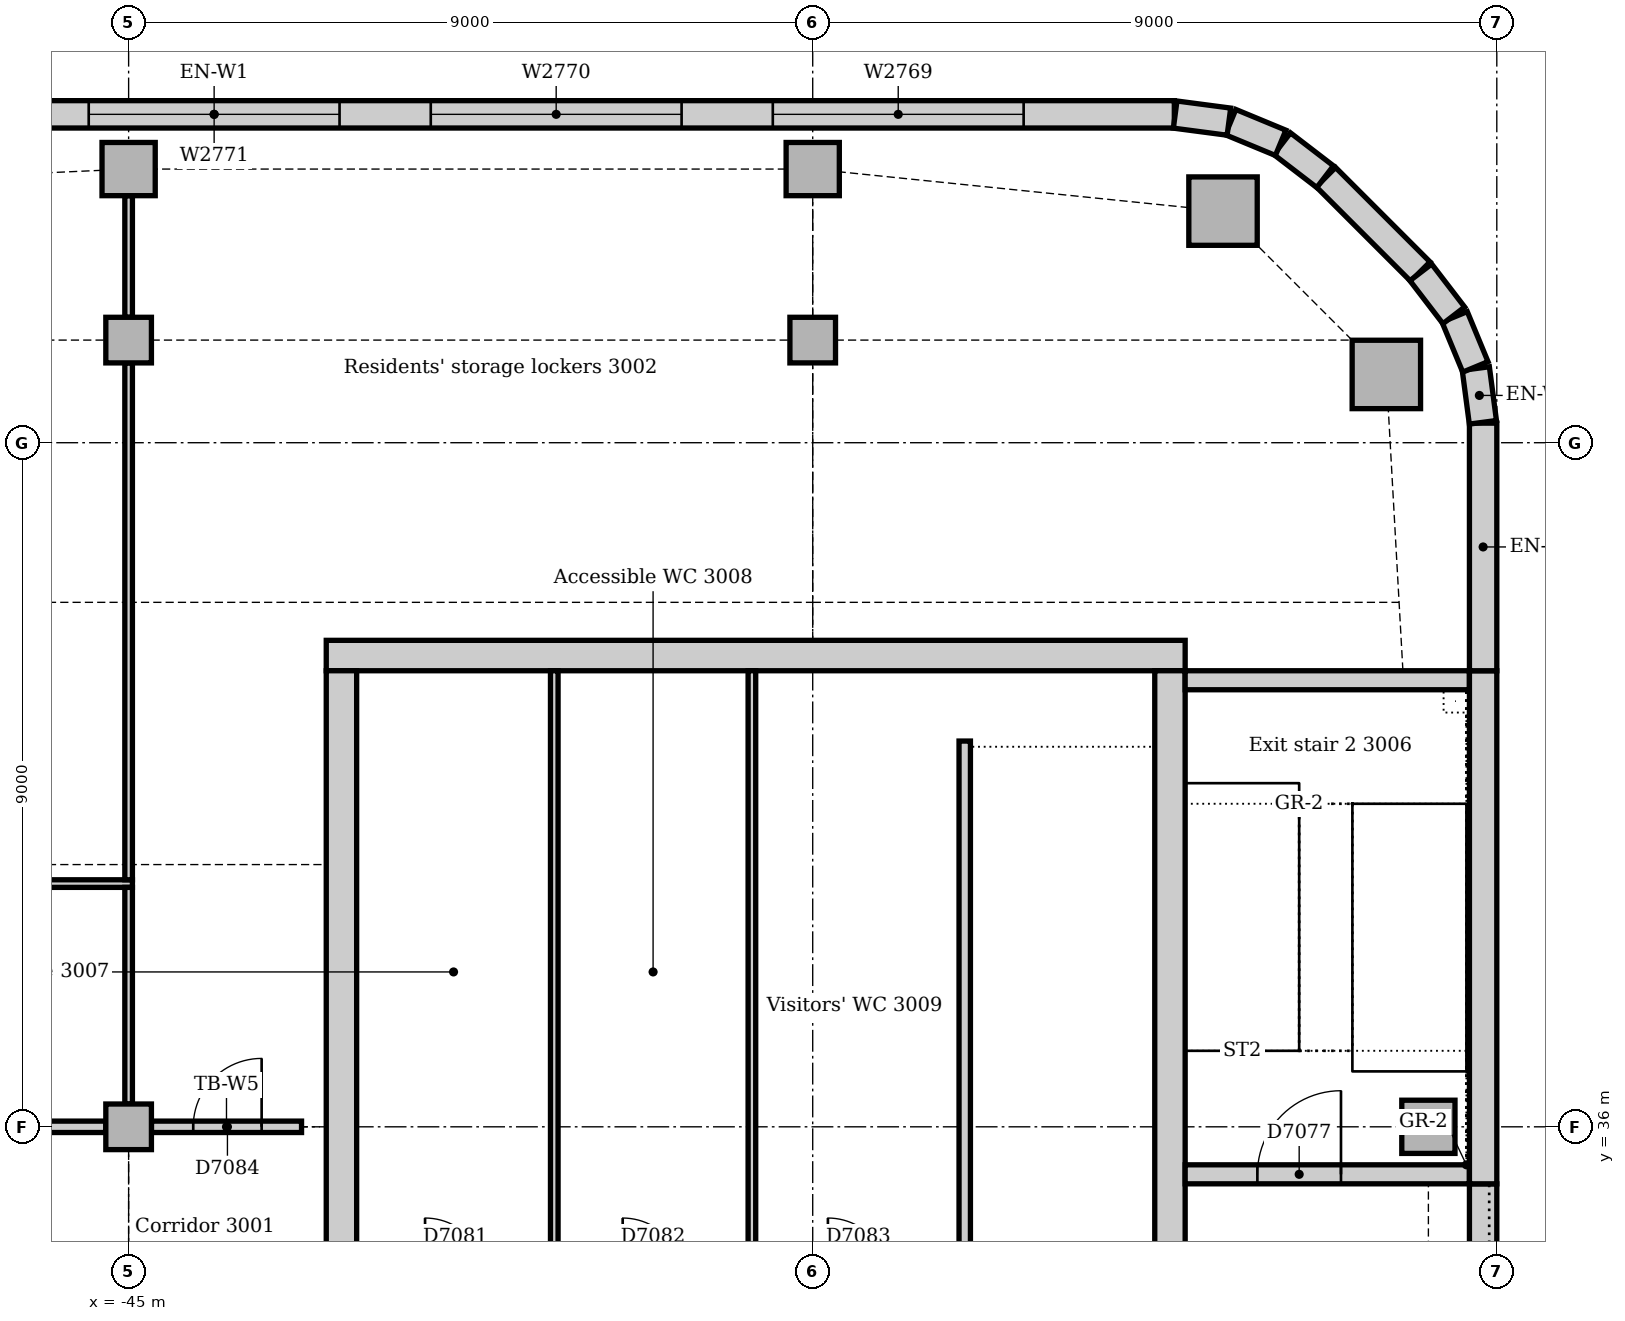
"""IFC4 building model, lengths in metres.
Left out: names, types, materials, properties, quantities, classifications, styles, units other than length and angle.
Written with IfcOpenShell. Run it as: python <this file> out.ifc"""

import sys

from ifc_helpers import new_model, si_unit, direction, frame, frame_2d, origin, origin_2d, place, context, subcontext, project, spatial, rectangle, extrude, element, fill, save


model = new_model("IFC4")
c1 = context("Model", 3, precision=1e-05, world=origin(), true_north=direction((0.0, 1.0)))
c2 = subcontext(c1, "Body", "Model", "MODEL_VIEW")
j1 = project(units=[si_unit("LENGTHUNIT", "METRE"), si_unit("PLANEANGLEUNIT", "RADIAN")], contexts=[c1])
p1 = place(None, origin())
s1 = spatial("IfcSite", under=j1, at=p1, CompositionType="ELEMENT")
p2 = place(p1, origin())
s2 = spatial("IfcBuilding", under=s1, at=p2, CompositionType="ELEMENT")
p3 = place(p2, frame((0.0, 0.0, 128.0)))
s3 = spatial("IfcBuildingStorey", under=s2, at=p3, CompositionType="ELEMENT", Elevation=128.0)
p4 = place(p3, frame((-31.1, 42.2, 0.0), z_axis=(0.0, 0.0, 1.0), x_axis=(-1.0, 0.0, 0.0)))
e1 = element("IfcWall", 1, at=p4, inside=s3, PredefinedType="SOLIDWALL", context=c2, shape_type="SweptSolid", body=[
    extrude(rectangle(XDim=11.3, YDim=0.4, at=frame_2d((5.65, 0.0))), origin(), (0.0, 0.0, 1.0), 4.0),
])
p5 = place(p3, frame((-31.3, 30.5, 0.0), z_axis=(0.0, 0.0, 1.0), x_axis=(0.0, 1.0, 0.0)))
e2 = element("IfcWall", 2, at=p5, inside=s3, PredefinedType="SOLIDWALL", context=c2, shape_type="SweptSolid", body=[
    extrude(rectangle(XDim=11.5, YDim=0.4, at=frame_2d((5.75, 0.0))), origin(), (0.0, 0.0, 1.0), 4.0),
])
p6 = place(p5, frame((0.85, 0.0, 0.0)))
e3 = element("IfcOpeningElement", 3, at=p6, cuts=e2, PredefinedType="OPENING", context=c2, shape_type="SweptSolid", body=[
    extrude(rectangle(XDim=1.8, YDim=2.1, at=frame_2d((0.9, 1.05))), frame((0.0, 0.21, 0.0), z_axis=(0.0, -1.0, 0.0), x_axis=(1.0, 0.0, 0.0)), (0.0, 0.0, 1.0), 0.42),
])
p7 = place(p3, frame((-42.2, 42.0, 0.0), z_axis=(0.0, 0.0, 1.0), x_axis=(0.0, -1.0, 0.0)))
e4 = element("IfcWall", 4, at=p7, inside=s3, PredefinedType="SOLIDWALL", context=c2, shape_type="SweptSolid", body=[
    extrude(rectangle(XDim=11.5, YDim=0.4, at=frame_2d((5.75, 0.0))), origin(), (0.0, 0.0, 1.0), 4.0),
])
p8 = place(p7, frame((8.85, 0.0, 0.0)))
e5 = element("IfcOpeningElement", 5, at=p8, cuts=e4, PredefinedType="OPENING", context=c2, shape_type="SweptSolid", body=[
    extrude(rectangle(XDim=1.8, YDim=2.1, at=frame_2d((0.9, 1.05))), frame((0.0, 0.21, 0.0), z_axis=(0.0, -1.0, 0.0), x_axis=(1.0, 0.0, 0.0)), (0.0, 0.0, 1.0), 0.42),
])
p9 = place(p3, frame((-31.1, 35.375, 0.0), z_axis=(0.0, 0.0, 1.0), x_axis=(1.0, 0.0, 0.0)))
e6 = element("IfcWall", 6, at=p9, inside=s3, PredefinedType="SOLIDWALL", context=c2, shape_type="SweptSolid", body=[
    extrude(rectangle(XDim=3.74, YDim=0.25, at=frame_2d((1.87, 0.0))), origin(), (0.0, 0.0, 1.0), 4.0),
])
p10 = place(p9, frame((0.95, 0.0, 0.0)))
e7 = element("IfcOpeningElement", 7, at=p10, cuts=e6, PredefinedType="OPENING", context=c2, shape_type="SweptSolid", body=[
    extrude(rectangle(XDim=1.1, YDim=2.1, at=frame_2d((0.55, 1.05))), frame((0.0, 0.135, 0.0), z_axis=(0.0, -1.0, 0.0), x_axis=(1.0, 0.0, 0.0)), (0.0, 0.0, 1.0), 0.27),
])
p11 = place(p3, frame((-27.36, 41.875, 0.0), z_axis=(0.0, 0.0, 1.0), x_axis=(-1.0, 0.0, 0.0)))
e8 = element("IfcWall", 8, at=p11, inside=s3, PredefinedType="SOLIDWALL", context=c2, shape_type="SweptSolid", body=[
    extrude(rectangle(XDim=3.74, YDim=0.25, at=frame_2d((1.87, 0.0))), origin(), (0.0, 0.0, 1.0), 4.0),
])
for number, where, z_axis, x_axis in (
    (9, (-28.453, 45.898, 0.0), (0.0, 0.0, 1.0), (1.0, 0.0, 0.0)),
    (10, (-30.602, 48.047, 0.0), (0.0, 0.0, 1.0), (1.0, 0.0, 0.0)),
):
    element("IfcColumn", number, at=place(p3, frame(where, z_axis=z_axis, x_axis=x_axis)), inside=s3, PredefinedType="COLUMN", context=c2, shape_type="SweptSolid", body=[
        extrude(rectangle(XDim=0.9, YDim=0.9, at=origin_2d()), origin(), (0.0, 0.0, 1.0), 3.85),
    ])
p12 = place(p3, frame((-27.9, 36.0, 0.0), z_axis=(0.0, 0.0, 1.0), x_axis=(1.0, 0.0, 0.0)))
e11 = element("IfcColumn", 11, at=p12, inside=s3, PredefinedType="COLUMN", context=c2, shape_type="SweptSolid", body=[
    extrude(rectangle(XDim=0.7, YDim=0.7, at=origin_2d()), origin(), (0.0, 0.0, 1.0), 4.0),
])
for number, where, z_axis, x_axis in (
    (12, (-45.0, 48.6, 0.0), (0.0, 0.0, 1.0), (1.0, 0.0, 0.0)),
    (13, (-36.0, 48.6, 0.0), (0.0, 0.0, 1.0), (1.0, 0.0, 0.0)),
):
    element("IfcColumn", number, at=place(p3, frame(where, z_axis=z_axis, x_axis=x_axis)), inside=s3, PredefinedType="COLUMN", context=c2, shape_type="SweptSolid", body=[
        extrude(rectangle(XDim=0.7, YDim=0.7, at=origin_2d()), origin(), (0.0, 0.0, 1.0), 3.85),
    ])
for number, where, z_axis, x_axis in (
    (14, (-45.0, 36.0, 0.0), (0.0, 0.0, 1.0), (1.0, 0.0, 0.0)),
    (15, (-45.0, 46.35, 0.0), (0.0, 0.0, 1.0), (1.0, 0.0, 0.0)),
    (16, (-36.0, 46.35, 0.0), (0.0, 0.0, 1.0), (1.0, 0.0, 0.0)),
):
    element("IfcColumn", number, at=place(p3, frame(where, z_axis=z_axis, x_axis=x_axis)), inside=s3, PredefinedType="COLUMN", context=c2, shape_type="SweptSolid", body=[
        extrude(rectangle(XDim=0.6, YDim=0.6, at=origin_2d()), origin(), (0.0, 0.0, 1.0), 3.85),
    ])
p13 = place(p3, frame((-27.18, 27.75, 0.0), z_axis=(0.0, 0.0, 1.0), x_axis=(0.0, 1.0, 0.0)))
e17 = element("IfcWall", 17, at=p13, inside=s3, PredefinedType="STANDARD", context=c2, shape_type="SweptSolid", body=[
    extrude(rectangle(XDim=7.5, YDim=0.36, at=frame_2d((3.75, 0.0))), origin(), (0.0, 0.0, 1.0), 3.85),
])
p14 = place(p13, frame((2.85, 0.0, 1.2)))
e18 = element("IfcOpeningElement", 18, at=p14, cuts=e17, PredefinedType="OPENING", context=c2, shape_type="SweptSolid", body=[
    extrude(rectangle(XDim=1.8, YDim=1.2, at=frame_2d((0.9, 0.6))), frame((0.0, 0.19, 0.0), z_axis=(0.0, -1.0, 0.0), x_axis=(1.0, 0.0, 0.0)), (0.0, 0.0, 1.0), 0.38),
])
p15 = place(p3, frame((-27.18, 35.25, 0.0), z_axis=(0.0, 0.0, 1.0), x_axis=(0.0, 1.0, 0.0)))
e19 = element("IfcWall", 19, at=p15, inside=s3, PredefinedType="STANDARD", context=c2, shape_type="SweptSolid", body=[
    extrude(rectangle(XDim=6.75, YDim=0.36, at=frame_2d((3.375, 0.0))), origin(), (0.0, 0.0, 1.0), 3.85),
])
p16 = place(p3, frame((-27.18, 42.0, 0.0), z_axis=(0.0, 0.0, 1.0), x_axis=(0.0, 1.0, 0.0)))
e20 = element("IfcWall", 20, at=p16, inside=s3, PredefinedType="STANDARD", context=c2, shape_type="SweptSolid", body=[
    extrude(rectangle(XDim=3.257, YDim=0.36, at=frame_2d((1.629, 0.0))), origin(), (0.0, 0.0, 1.0), 3.85),
])
p17 = place(p3, frame((-28.006, 47.251, 0.0), z_axis=(0.0, 0.0, 1.0), x_axis=(-0.707106781187, 0.707106781187, 0.0)))
e21 = element("IfcWall", 21, at=p17, inside=s3, PredefinedType="STANDARD", context=c2, shape_type="SweptSolid", body=[
    extrude(rectangle(XDim=1.757, YDim=0.36, at=frame_2d((0.879, 0.0))), origin(), (0.0, 0.0, 1.0), 3.85),
])
p18 = place(p3, frame((-31.243, 49.32, 0.0), z_axis=(0.0, 0.0, 1.0), x_axis=(-1.0, 0.0, 0.0)))
e22 = element("IfcWall", 22, at=p18, inside=s3, PredefinedType="STANDARD", context=c2, shape_type="SweptSolid", body=[
    extrude(rectangle(XDim=25.265, YDim=0.36, at=frame_2d((12.632, 0.0))), origin(), (0.0, 0.0, 1.0), 3.85),
])
p19 = place(p18, frame((1.982, 0.0, 0.9)))
e23 = element("IfcOpeningElement", 23, at=p19, cuts=e22, PredefinedType="OPENING", context=c2, shape_type="SweptSolid", body=[
    extrude(rectangle(XDim=3.3, YDim=1.6, at=frame_2d((1.65, 0.8))), frame((0.0, 0.19, 0.0), z_axis=(0.0, -1.0, 0.0), x_axis=(1.0, 0.0, 0.0)), (0.0, 0.0, 1.0), 0.38),
])
p20 = place(p18, frame((6.482, 0.0, 0.9)))
e24 = element("IfcOpeningElement", 24, at=p20, cuts=e22, PredefinedType="OPENING", context=c2, shape_type="SweptSolid", body=[
    extrude(rectangle(XDim=3.3, YDim=1.6, at=frame_2d((1.65, 0.8))), frame((0.0, 0.19, 0.0), z_axis=(0.0, -1.0, 0.0), x_axis=(1.0, 0.0, 0.0)), (0.0, 0.0, 1.0), 0.38),
])
p21 = place(p18, frame((10.982, 0.0, 0.9)))
e25 = element("IfcOpeningElement", 25, at=p21, cuts=e22, PredefinedType="OPENING", context=c2, shape_type="SweptSolid", body=[
    extrude(rectangle(XDim=3.3, YDim=1.6, at=frame_2d((1.65, 0.8))), frame((0.0, 0.19, 0.0), z_axis=(0.0, -1.0, 0.0), x_axis=(1.0, 0.0, 0.0)), (0.0, 0.0, 1.0), 0.38),
])
p22 = place(p18, frame((15.482, 0.0, 0.9)))
e26 = element("IfcOpeningElement", 26, at=p22, cuts=e22, PredefinedType="OPENING", context=c2, shape_type="SweptSolid", body=[
    extrude(rectangle(XDim=3.3, YDim=1.6, at=frame_2d((1.65, 0.8))), frame((0.0, 0.19, 0.0), z_axis=(0.0, -1.0, 0.0), x_axis=(1.0, 0.0, 0.0)), (0.0, 0.0, 1.0), 0.38),
])
p23 = place(p18, frame((19.982, 0.0, 0.9)))
e27 = element("IfcOpeningElement", 27, at=p23, cuts=e22, PredefinedType="OPENING", context=c2, shape_type="SweptSolid", body=[
    extrude(rectangle(XDim=3.3, YDim=1.6, at=frame_2d((1.65, 0.8))), frame((0.0, 0.19, 0.0), z_axis=(0.0, -1.0, 0.0), x_axis=(1.0, 0.0, 0.0)), (0.0, 0.0, 1.0), 0.38),
])
for number, where, z_axis, x_axis in (
    (28, (-27.183, 45.269, 0.0), (0.0, 0.0, 1.0), (-0.131, 0.991, 0.0)),
    (29, (-27.282, 45.997, 0.0), (0.0, 0.0, 1.0), (-0.383, 0.924, 0.0)),
):
    element("IfcWall", number, at=place(p3, frame(where, z_axis=z_axis, x_axis=x_axis)), inside=s3, PredefinedType="STANDARD", context=c2, shape_type="SweptSolid", body=[
        extrude(rectangle(XDim=0.713, YDim=0.36, at=frame_2d((0.356, 0.0))), origin(), (0.0, 0.0, 1.0), 3.85),
    ])
for number, where, z_axis, x_axis in (
    (30, (-27.566, 46.675, 0.0), (0.0, 0.0, 1.0), (-0.609, 0.793, 0.0)),
    (31, (-29.259, 48.5, 0.0), (0.0, 0.0, 1.0), (-0.793, 0.609, 0.0)),
):
    element("IfcWall", number, at=place(p3, frame(where, z_axis=z_axis, x_axis=x_axis)), inside=s3, PredefinedType="STANDARD", context=c2, shape_type="SweptSolid", body=[
        extrude(rectangle(XDim=0.713, YDim=0.36, at=frame_2d((0.357, 0.0))), origin(), (0.0, 0.0, 1.0), 3.85),
    ])
for number, where, z_axis, x_axis in (
    (32, (-29.844, 48.945, 0.0), (0.0, 0.0, 1.0), (-0.924, 0.383, 0.0)),
    (33, (-30.524, 49.224, 0.0), (0.0, 0.0, 1.0), (-0.991, 0.131, 0.0)),
):
    element("IfcWall", number, at=place(p3, frame(where, z_axis=z_axis, x_axis=x_axis)), inside=s3, PredefinedType="STANDARD", context=c2, shape_type="SweptSolid", body=[
        extrude(rectangle(XDim=0.713, YDim=0.36, at=frame_2d((0.356, 0.0))), origin(), (0.0, 0.0, 1.0), 3.85),
    ])
p24 = place(p3, frame((-34.0, 41.075, 0.0), z_axis=(0.0, 0.0, 1.0), x_axis=(0.0, -1.0, 0.0)))
e34 = element("IfcWall", 34, at=p24, inside=s3, PredefinedType="SOLIDWALL", context=c2, shape_type="SweptSolid", body=[
    extrude(rectangle(XDim=7.0, YDim=0.15, at=frame_2d((3.5, 0.0))), origin(), (0.0, 0.0, 1.0), 4.0),
])
for number, where, z_axis, x_axis in (
    (35, (-39.4, 34.075, 0.0), (0.0, 0.0, 1.0), (0.0, 1.0, 0.0)),
    (36, (-36.8, 34.075, 0.0), (0.0, 0.0, 1.0), (0.0, 1.0, 0.0)),
):
    element("IfcWall", number, at=place(p3, frame(where, z_axis=z_axis, x_axis=x_axis)), inside=s3, PredefinedType="PARTITIONING", context=c2, shape_type="SweptSolid", body=[
        extrude(rectangle(XDim=7.925, YDim=0.1, at=frame_2d((3.962, 0.0))), origin(), (0.0, 0.0, 1.0), 3.85),
    ])
p25 = place(p3, frame((-44.7, 36.0, 0.0), z_axis=(0.0, 0.0, 1.0), x_axis=(1.0, 0.0, 0.0)))
e37 = element("IfcWall", 37, at=p25, inside=s3, PredefinedType="PARTITIONING", context=c2, shape_type="SweptSolid", body=[
    extrude(rectangle(XDim=1.975, YDim=0.15, at=frame_2d((0.988, 0.0))), origin(), (0.0, 0.0, 1.0), 3.602),
])
p26 = place(p25, frame((0.55, 0.0, 0.0)))
e38 = element("IfcOpeningElement", 38, at=p26, cuts=e37, PredefinedType="OPENING", context=c2, shape_type="SweptSolid", body=[
    extrude(rectangle(XDim=0.9, YDim=2.1, at=frame_2d((0.45, 1.05))), frame((0.0, 0.085, 0.0), z_axis=(0.0, -1.0, 0.0), x_axis=(1.0, 0.0, 0.0)), (0.0, 0.0, 1.0), 0.17),
])
p27 = place(p3, frame((-53.7, 36.0, 0.0), z_axis=(0.0, 0.0, 1.0), x_axis=(1.0, 0.0, 0.0)))
e39 = element("IfcWall", 39, at=p27, inside=s3, PredefinedType="PARTITIONING", context=c2, shape_type="SweptSolid", body=[
    extrude(rectangle(XDim=8.4, YDim=0.15, at=frame_2d((4.2, 0.0))), origin(), (0.0, 0.0, 1.0), 3.262),
])
p28 = place(p27, frame((0.3, 0.0, 0.0)))
e40 = element("IfcOpeningElement", 40, at=p28, cuts=e39, PredefinedType="OPENING", context=c2, shape_type="SweptSolid", body=[
    extrude(rectangle(XDim=1.0, YDim=2.1, at=frame_2d((0.5, 1.05))), frame((0.0, 0.085, 0.0), z_axis=(0.0, -1.0, 0.0), x_axis=(1.0, 0.0, 0.0)), (0.0, 0.0, 1.0), 0.17),
])
p29 = place(p3, frame((-60.39, 39.2, 0.0), z_axis=(0.0, 0.0, 1.0), x_axis=(1.0, 0.0, 0.0)))
e41 = element("IfcWall", 41, at=p29, inside=s3, PredefinedType="PARTITIONING", context=c2, shape_type="SweptSolid", body=[
    extrude(rectangle(XDim=15.44, YDim=0.1, at=frame_2d((7.72, 0.0))), origin(), (0.0, 0.0, 1.0), 3.85),
])
p30 = place(p29, frame((6.021, 0.0, 0.0)))
e42 = element("IfcOpeningElement", 42, at=p30, cuts=e41, PredefinedType="OPENING", context=c2, shape_type="SweptSolid", body=[
    extrude(rectangle(XDim=0.9, YDim=2.1, at=frame_2d((0.45, 1.05))), frame((0.0, 0.06, 0.0), z_axis=(0.0, -1.0, 0.0), x_axis=(1.0, 0.0, 0.0)), (0.0, 0.0, 1.0), 0.12),
])
p31 = place(p3, frame((-45.0, 39.25, 0.0), z_axis=(0.0, 0.0, 1.0), x_axis=(0.0, 1.0, 0.0)))
e43 = element("IfcWall", 43, at=p31, inside=s3, PredefinedType="PARTITIONING", context=c2, shape_type="SweptSolid", body=[
    extrude(rectangle(XDim=6.8, YDim=0.1, at=frame_2d((3.4, 0.0))), origin(), (0.0, 0.0, 1.0), 3.362),
])
p32 = place(p3, frame((-45.0, 36.3, 0.0), z_axis=(0.0, 0.0, 1.0), x_axis=(0.0, 1.0, 0.0)))
e44 = element("IfcWall", 44, at=p32, inside=s3, PredefinedType="PARTITIONING", context=c2, shape_type="SweptSolid", body=[
    extrude(rectangle(XDim=2.85, YDim=0.1, at=frame_2d((1.425, 0.0))), origin(), (0.0, 0.0, 1.0), 3.362),
])
p33 = place(p3, frame((-45.0, 46.65, 0.0), z_axis=(0.0, 0.0, 1.0), x_axis=(0.0, 1.0, 0.0)))
e45 = element("IfcWall", 45, at=p33, inside=s3, PredefinedType="PARTITIONING", context=c2, shape_type="SweptSolid", body=[
    extrude(rectangle(XDim=1.6, YDim=0.1, at=frame_2d((0.8, 0.0))), origin(), (0.0, 0.0, 1.0), 3.652),
])
p34 = place(p19, origin())
e46 = element("IfcWindow", 46, at=p34, inside=s3, PartitioningType="SINGLE_PANEL", PredefinedType="WINDOW", context=c2, shape_type="SweptSolid", body=[
    extrude(rectangle(XDim=3.3, YDim=1.6, at=frame_2d((1.65, 0.8))), frame((0.0, 0.13, 0.0), z_axis=(0.0, -1.0, 0.0), x_axis=(1.0, 0.0, 0.0)), (0.0, 0.0, 1.0), 0.06),
])
fill(e23, e46)
p35 = place(p20, origin())
e47 = element("IfcWindow", 47, at=p35, inside=s3, PartitioningType="SINGLE_PANEL", PredefinedType="WINDOW", context=c2, shape_type="SweptSolid", body=[
    extrude(rectangle(XDim=3.3, YDim=1.6, at=frame_2d((1.65, 0.8))), frame((0.0, 0.13, 0.0), z_axis=(0.0, -1.0, 0.0), x_axis=(1.0, 0.0, 0.0)), (0.0, 0.0, 1.0), 0.06),
])
fill(e24, e47)
p36 = place(p21, origin())
e48 = element("IfcWindow", 48, at=p36, inside=s3, PartitioningType="SINGLE_PANEL", PredefinedType="WINDOW", context=c2, shape_type="SweptSolid", body=[
    extrude(rectangle(XDim=3.3, YDim=1.6, at=frame_2d((1.65, 0.8))), frame((0.0, 0.13, 0.0), z_axis=(0.0, -1.0, 0.0), x_axis=(1.0, 0.0, 0.0)), (0.0, 0.0, 1.0), 0.06),
])
fill(e25, e48)
p37 = place(p10, origin())
e49 = element("IfcDoor", 49, at=p37, inside=s3, OperationType="SINGLE_SWING_RIGHT", PredefinedType="DOOR", context=c2, shape_type="SweptSolid", body=[
    extrude(rectangle(XDim=1.1, YDim=2.1, at=frame_2d((0.55, 1.05))), frame((0.0, 0.025, 0.0), z_axis=(0.0, -1.0, 0.0), x_axis=(1.0, 0.0, 0.0)), (0.0, 0.0, 1.0), 0.05),
])
fill(e7, e49)
p38 = place(p26, origin())
e50 = element("IfcDoor", 50, at=p38, inside=s3, OperationType="SINGLE_SWING_RIGHT", PredefinedType="DOOR", context=c2, shape_type="SweptSolid", body=[
    extrude(rectangle(XDim=0.9, YDim=2.1, at=frame_2d((0.45, 1.05))), frame((0.0, 0.025, 0.0), z_axis=(0.0, -1.0, 0.0), x_axis=(1.0, 0.0, 0.0)), (0.0, 0.0, 1.0), 0.05),
])
fill(e38, e50)
save(model, sys.argv[1])
